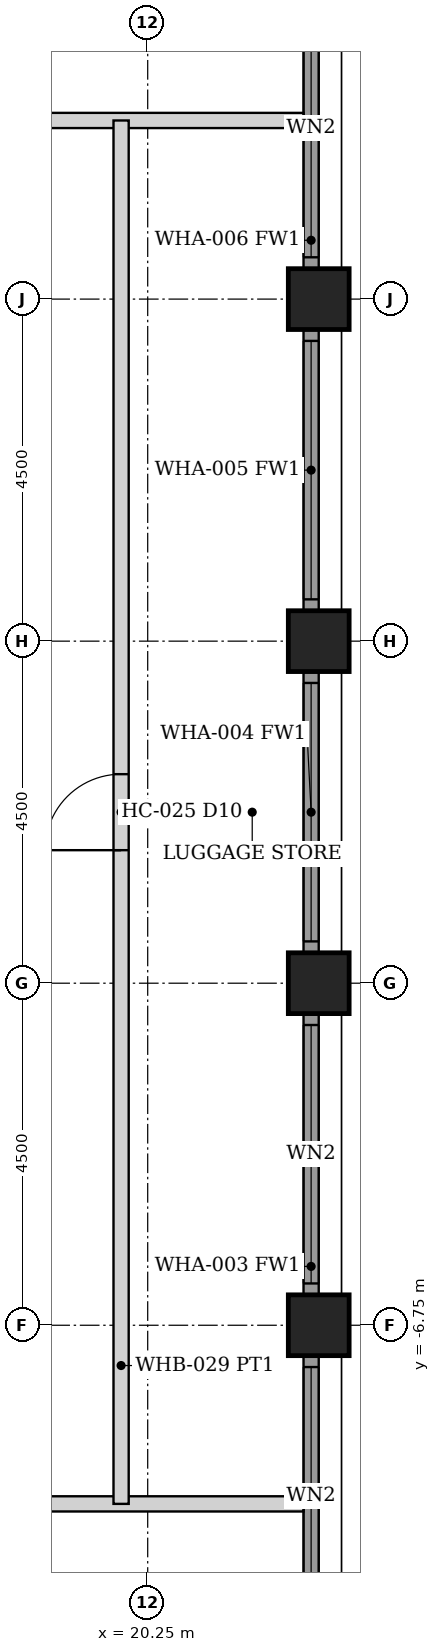
"""IFC4 building model, lengths in metres.
Left out: names, types, materials, properties, quantities, classifications, styles, units other than length and angle.
Written with IfcOpenShell. Run it as: python <this file> out.ifc"""

import sys

from ifc_helpers import new_model, si_unit, direction, frame, frame_2d, origin, origin_2d, place, context, subcontext, project, spatial, rectangle, hollow_rectangle, extrude, element, fill, save


model = new_model("IFC4")
c1 = context("Model", 3, precision=1e-05, world=origin(), true_north=direction((0.0, 1.0)))
c2 = subcontext(c1, "Body", "Model", "MODEL_VIEW")
j1 = project(units=[si_unit("LENGTHUNIT", "METRE"), si_unit("PLANEANGLEUNIT", "RADIAN")], contexts=[c1])
p1 = place(None, origin())
s1 = spatial("IfcSite", under=j1, at=p1, CompositionType="ELEMENT")
p2 = place(p1, origin())
s2 = spatial("IfcBuilding", under=s1, at=p2, CompositionType="ELEMENT")
p3 = place(p2, frame((0.0, 0.0, 140.0)))
s3 = spatial("IfcBuildingStorey", under=s2, at=p3, CompositionType="ELEMENT", Elevation=140.0)
for number, where, z_axis, x_axis in (
    (1, (22.5, -6.75, 0.0), (0.0, 0.0, 1.0), (1.0, 0.0, 0.0)),
    (2, (22.5, -2.25, 0.0), (0.0, 0.0, 1.0), (1.0, 0.0, 0.0)),
    (3, (22.5, 2.25, 0.0), (0.0, 0.0, 1.0), (1.0, 0.0, 0.0)),
    (4, (22.5, 6.75, 0.0), (0.0, 0.0, 1.0), (1.0, 0.0, 0.0)),
):
    element("IfcColumn", number, at=place(p3, frame(where, z_axis=z_axis, x_axis=x_axis)), inside=s3, PredefinedType="COLUMN", context=c2, shape_type="SweptSolid", body=[
        extrude(hollow_rectangle(XDim=0.8, YDim=0.8, WallThickness=0.05, at=origin_2d()), origin(), (0.0, 0.0, 1.0), 3.6),
    ])
p4 = place(p3, frame((22.4, -10.845, 0.0), z_axis=(0.0, 0.0, 1.0), x_axis=(0.0, 1.0, 0.0)))
e5 = element("IfcWall", 5, at=p4, inside=s3, PredefinedType="SOLIDWALL", context=c2, shape_type="SweptSolid", body=[
    extrude(rectangle(XDim=3.69, YDim=0.2, at=frame_2d((1.845, 0.0))), origin(), (0.0, 0.0, 1.0), 2.479),
])
p5 = place(p4, frame((0.145, 0.0, 0.3)))
e6 = element("IfcOpeningElement", 6, at=p5, cuts=e5, PredefinedType="OPENING", context=c2, shape_type="SweptSolid", body=[
    extrude(rectangle(XDim=3.4, YDim=2.029, at=frame_2d((1.7, 1.015))), frame((0.0, 0.11, 0.0), z_axis=(0.0, -1.0, 0.0), x_axis=(1.0, 0.0, 0.0)), (0.0, 0.0, 1.0), 0.22),
])
p6 = place(p3, frame((22.4, -6.345, 0.0), z_axis=(0.0, 0.0, 1.0), x_axis=(0.0, 1.0, 0.0)))
e7 = element("IfcWall", 7, at=p6, inside=s3, PredefinedType="SOLIDWALL", context=c2, shape_type="SweptSolid", body=[
    extrude(rectangle(XDim=3.69, YDim=0.2, at=frame_2d((1.845, 0.0))), origin(), (0.0, 0.0, 1.0), 2.479),
])
p7 = place(p6, frame((0.145, 0.0, 0.3)))
e8 = element("IfcOpeningElement", 8, at=p7, cuts=e7, PredefinedType="OPENING", context=c2, shape_type="SweptSolid", body=[
    extrude(rectangle(XDim=3.4, YDim=2.029, at=frame_2d((1.7, 1.015))), frame((0.0, 0.11, 0.0), z_axis=(0.0, -1.0, 0.0), x_axis=(1.0, 0.0, 0.0)), (0.0, 0.0, 1.0), 0.22),
])
p8 = place(p3, frame((22.4, -1.845, 0.0), z_axis=(0.0, 0.0, 1.0), x_axis=(0.0, 1.0, 0.0)))
e9 = element("IfcWall", 9, at=p8, inside=s3, PredefinedType="SOLIDWALL", context=c2, shape_type="SweptSolid", body=[
    extrude(rectangle(XDim=3.69, YDim=0.2, at=frame_2d((1.845, 0.0))), origin(), (0.0, 0.0, 1.0), 2.479),
])
p9 = place(p8, frame((0.145, 0.0, 0.3)))
e10 = element("IfcOpeningElement", 10, at=p9, cuts=e9, PredefinedType="OPENING", context=c2, shape_type="SweptSolid", body=[
    extrude(rectangle(XDim=3.4, YDim=2.029, at=frame_2d((1.7, 1.015))), frame((0.0, 0.11, 0.0), z_axis=(0.0, -1.0, 0.0), x_axis=(1.0, 0.0, 0.0)), (0.0, 0.0, 1.0), 0.22),
])
p10 = place(p3, frame((22.4, 2.655, 0.0), z_axis=(0.0, 0.0, 1.0), x_axis=(0.0, 1.0, 0.0)))
e11 = element("IfcWall", 11, at=p10, inside=s3, PredefinedType="SOLIDWALL", context=c2, shape_type="SweptSolid", body=[
    extrude(rectangle(XDim=3.69, YDim=0.2, at=frame_2d((1.845, 0.0))), origin(), (0.0, 0.0, 1.0), 2.479),
])
p11 = place(p10, frame((0.145, 0.0, 0.3)))
e12 = element("IfcOpeningElement", 12, at=p11, cuts=e11, PredefinedType="OPENING", context=c2, shape_type="SweptSolid", body=[
    extrude(rectangle(XDim=3.4, YDim=2.029, at=frame_2d((1.7, 1.015))), frame((0.0, 0.11, 0.0), z_axis=(0.0, -1.0, 0.0), x_axis=(1.0, 0.0, 0.0)), (0.0, 0.0, 1.0), 0.22),
])
p12 = place(p3, frame((22.4, 7.155, 0.0), z_axis=(0.0, 0.0, 1.0), x_axis=(0.0, 1.0, 0.0)))
e13 = element("IfcWall", 13, at=p12, inside=s3, PredefinedType="SOLIDWALL", context=c2, shape_type="SweptSolid", body=[
    extrude(rectangle(XDim=3.69, YDim=0.2, at=frame_2d((1.845, 0.0))), origin(), (0.0, 0.0, 1.0), 2.479),
])
p13 = place(p12, frame((0.145, 0.0, 0.3)))
e14 = element("IfcOpeningElement", 14, at=p13, cuts=e13, PredefinedType="OPENING", context=c2, shape_type="SweptSolid", body=[
    extrude(rectangle(XDim=3.4, YDim=2.029, at=frame_2d((1.7, 1.015))), frame((0.0, 0.11, 0.0), z_axis=(0.0, -1.0, 0.0), x_axis=(1.0, 0.0, 0.0)), (0.0, 0.0, 1.0), 0.22),
])
p14 = place(p3, frame((-22.3, 9.1, 0.0), z_axis=(0.0, 0.0, 1.0), x_axis=(1.0, 0.0, 0.0)))
e15 = element("IfcWall", 15, at=p14, inside=s3, PredefinedType="PARTITIONING", context=c2, shape_type="SweptSolid", body=[
    extrude(rectangle(XDim=44.6, YDim=0.2, at=frame_2d((22.3, 0.0))), origin(), (0.0, 0.0, 1.0), 2.473),
])
p15 = place(p14, frame((6.75, 0.0, 0.0)))
e16 = element("IfcOpeningElement", 16, at=p15, cuts=e15, PredefinedType="OPENING", context=c2, shape_type="SweptSolid", body=[
    extrude(rectangle(XDim=0.9, YDim=2.1, at=frame_2d((0.45, 1.05))), frame((0.0, 0.11, 0.0), z_axis=(0.0, -1.0, 0.0), x_axis=(1.0, 0.0, 0.0)), (0.0, 0.0, 1.0), 0.22),
])
p16 = place(p14, frame((14.45, 0.0, 0.0)))
e17 = element("IfcOpeningElement", 17, at=p16, cuts=e15, PredefinedType="OPENING", context=c2, shape_type="SweptSolid", body=[
    extrude(rectangle(XDim=0.9, YDim=2.1, at=frame_2d((0.45, 1.05))), frame((0.0, 0.11, 0.0), z_axis=(0.0, -1.0, 0.0), x_axis=(1.0, 0.0, 0.0)), (0.0, 0.0, 1.0), 0.22),
])
p17 = place(p14, frame((15.75, 0.0, 0.0)))
e18 = element("IfcOpeningElement", 18, at=p17, cuts=e15, PredefinedType="OPENING", context=c2, shape_type="SweptSolid", body=[
    extrude(rectangle(XDim=0.9, YDim=2.1, at=frame_2d((0.45, 1.05))), frame((0.0, 0.11, 0.0), z_axis=(0.0, -1.0, 0.0), x_axis=(1.0, 0.0, 0.0)), (0.0, 0.0, 1.0), 0.22),
])
p18 = place(p14, frame((23.45, 0.0, 0.0)))
e19 = element("IfcOpeningElement", 19, at=p18, cuts=e15, PredefinedType="OPENING", context=c2, shape_type="SweptSolid", body=[
    extrude(rectangle(XDim=0.9, YDim=2.1, at=frame_2d((0.45, 1.05))), frame((0.0, 0.11, 0.0), z_axis=(0.0, -1.0, 0.0), x_axis=(1.0, 0.0, 0.0)), (0.0, 0.0, 1.0), 0.22),
])
p19 = place(p14, frame((24.75, 0.0, 0.0)))
e20 = element("IfcOpeningElement", 20, at=p19, cuts=e15, PredefinedType="OPENING", context=c2, shape_type="SweptSolid", body=[
    extrude(rectangle(XDim=0.9, YDim=2.1, at=frame_2d((0.45, 1.05))), frame((0.0, 0.11, 0.0), z_axis=(0.0, -1.0, 0.0), x_axis=(1.0, 0.0, 0.0)), (0.0, 0.0, 1.0), 0.22),
])
p20 = place(p14, frame((36.95, 0.0, 0.0)))
e21 = element("IfcOpeningElement", 21, at=p20, cuts=e15, PredefinedType="OPENING", context=c2, shape_type="SweptSolid", body=[
    extrude(rectangle(XDim=0.9, YDim=2.1, at=frame_2d((0.45, 1.05))), frame((0.0, 0.11, 0.0), z_axis=(0.0, -1.0, 0.0), x_axis=(1.0, 0.0, 0.0)), (0.0, 0.0, 1.0), 0.22),
])
p21 = place(p14, frame((38.85, 0.0, 0.0)))
e22 = element("IfcOpeningElement", 22, at=p21, cuts=e15, PredefinedType="OPENING", context=c2, shape_type="SweptSolid", body=[
    extrude(rectangle(XDim=0.9, YDim=2.1, at=frame_2d((0.45, 1.05))), frame((0.0, 0.11, 0.0), z_axis=(0.0, -1.0, 0.0), x_axis=(1.0, 0.0, 0.0)), (0.0, 0.0, 1.0), 0.22),
])
p22 = place(p14, frame((4.85, 0.0, 0.0)))
e23 = element("IfcOpeningElement", 23, at=p22, cuts=e15, PredefinedType="OPENING", context=c2, shape_type="SweptSolid", body=[
    extrude(rectangle(XDim=0.9, YDim=2.1, at=frame_2d((0.45, 1.05))), frame((0.0, 0.11, 0.0), z_axis=(0.0, -1.0, 0.0), x_axis=(1.0, 0.0, 0.0)), (0.0, 0.0, 1.0), 0.22),
])
p23 = place(p3, frame((-22.3, -9.1, 0.0), z_axis=(0.0, 0.0, 1.0), x_axis=(1.0, 0.0, 0.0)))
e24 = element("IfcWall", 24, at=p23, inside=s3, PredefinedType="PARTITIONING", context=c2, shape_type="SweptSolid", body=[
    extrude(rectangle(XDim=44.6, YDim=0.2, at=frame_2d((22.3, 0.0))), origin(), (0.0, 0.0, 1.0), 2.473),
])
p24 = place(p23, frame((6.75, 0.0, 0.0)))
e25 = element("IfcOpeningElement", 25, at=p24, cuts=e24, PredefinedType="OPENING", context=c2, shape_type="SweptSolid", body=[
    extrude(rectangle(XDim=0.9, YDim=2.1, at=frame_2d((0.45, 1.05))), frame((0.0, 0.11, 0.0), z_axis=(0.0, -1.0, 0.0), x_axis=(1.0, 0.0, 0.0)), (0.0, 0.0, 1.0), 0.22),
])
p25 = place(p23, frame((14.45, 0.0, 0.0)))
e26 = element("IfcOpeningElement", 26, at=p25, cuts=e24, PredefinedType="OPENING", context=c2, shape_type="SweptSolid", body=[
    extrude(rectangle(XDim=0.9, YDim=2.1, at=frame_2d((0.45, 1.05))), frame((0.0, 0.11, 0.0), z_axis=(0.0, -1.0, 0.0), x_axis=(1.0, 0.0, 0.0)), (0.0, 0.0, 1.0), 0.22),
])
p26 = place(p23, frame((15.75, 0.0, 0.0)))
e27 = element("IfcOpeningElement", 27, at=p26, cuts=e24, PredefinedType="OPENING", context=c2, shape_type="SweptSolid", body=[
    extrude(rectangle(XDim=0.9, YDim=2.1, at=frame_2d((0.45, 1.05))), frame((0.0, 0.11, 0.0), z_axis=(0.0, -1.0, 0.0), x_axis=(1.0, 0.0, 0.0)), (0.0, 0.0, 1.0), 0.22),
])
p27 = place(p23, frame((24.75, 0.0, 0.0)))
e28 = element("IfcOpeningElement", 28, at=p27, cuts=e24, PredefinedType="OPENING", context=c2, shape_type="SweptSolid", body=[
    extrude(rectangle(XDim=0.9, YDim=2.1, at=frame_2d((0.45, 1.05))), frame((0.0, 0.11, 0.0), z_axis=(0.0, -1.0, 0.0), x_axis=(1.0, 0.0, 0.0)), (0.0, 0.0, 1.0), 0.22),
])
p28 = place(p23, frame((36.95, 0.0, 0.0)))
e29 = element("IfcOpeningElement", 29, at=p28, cuts=e24, PredefinedType="OPENING", context=c2, shape_type="SweptSolid", body=[
    extrude(rectangle(XDim=0.9, YDim=2.1, at=frame_2d((0.45, 1.05))), frame((0.0, 0.11, 0.0), z_axis=(0.0, -1.0, 0.0), x_axis=(1.0, 0.0, 0.0)), (0.0, 0.0, 1.0), 0.22),
])
p29 = place(p23, frame((38.85, 0.0, 0.0)))
e30 = element("IfcOpeningElement", 30, at=p29, cuts=e24, PredefinedType="OPENING", context=c2, shape_type="SweptSolid", body=[
    extrude(rectangle(XDim=0.9, YDim=2.1, at=frame_2d((0.45, 1.05))), frame((0.0, 0.11, 0.0), z_axis=(0.0, -1.0, 0.0), x_axis=(1.0, 0.0, 0.0)), (0.0, 0.0, 1.0), 0.22),
])
p30 = place(p23, frame((4.85, 0.0, 0.0)))
e31 = element("IfcOpeningElement", 31, at=p30, cuts=e24, PredefinedType="OPENING", context=c2, shape_type="SweptSolid", body=[
    extrude(rectangle(XDim=0.9, YDim=2.1, at=frame_2d((0.45, 1.05))), frame((0.0, 0.11, 0.0), z_axis=(0.0, -1.0, 0.0), x_axis=(1.0, 0.0, 0.0)), (0.0, 0.0, 1.0), 0.22),
])
p31 = place(p3, frame((19.9, -9.1, 0.0), z_axis=(0.0, 0.0, 1.0), x_axis=(0.0, 1.0, 0.0)))
e32 = element("IfcWall", 32, at=p31, inside=s3, PredefinedType="PARTITIONING", context=c2, shape_type="SweptSolid", body=[
    extrude(rectangle(XDim=18.2, YDim=0.2, at=frame_2d((9.1, 0.0))), origin(), (0.0, 0.0, 1.0), 2.473),
])
p32 = place(p31, frame((8.6, 0.0, 0.0)))
e33 = element("IfcOpeningElement", 33, at=p32, cuts=e32, PredefinedType="OPENING", context=c2, shape_type="SweptSolid", body=[
    extrude(rectangle(XDim=1.0, YDim=2.1, at=frame_2d((0.5, 1.05))), frame((0.0, 0.11, 0.0), z_axis=(0.0, -1.0, 0.0), x_axis=(1.0, 0.0, 0.0)), (0.0, 0.0, 1.0), 0.22),
])
p33 = place(p5, origin())
e34 = element("IfcWindow", 34, at=p33, inside=s3, PartitioningType="SINGLE_PANEL", PredefinedType="WINDOW", context=c2, shape_type="SweptSolid", body=[
    extrude(rectangle(XDim=3.4, YDim=2.029, at=frame_2d((1.7, 1.015))), frame((0.0, 0.03, 0.0), z_axis=(0.0, -1.0, 0.0), x_axis=(1.0, 0.0, 0.0)), (0.0, 0.0, 1.0), 0.06),
])
fill(e6, e34)
p34 = place(p7, origin())
e35 = element("IfcWindow", 35, at=p34, inside=s3, PartitioningType="SINGLE_PANEL", PredefinedType="WINDOW", context=c2, shape_type="SweptSolid", body=[
    extrude(rectangle(XDim=3.4, YDim=2.029, at=frame_2d((1.7, 1.015))), frame((0.0, 0.03, 0.0), z_axis=(0.0, -1.0, 0.0), x_axis=(1.0, 0.0, 0.0)), (0.0, 0.0, 1.0), 0.06),
])
fill(e8, e35)
p35 = place(p9, origin())
e36 = element("IfcWindow", 36, at=p35, inside=s3, PartitioningType="SINGLE_PANEL", PredefinedType="WINDOW", context=c2, shape_type="SweptSolid", body=[
    extrude(rectangle(XDim=3.4, YDim=2.029, at=frame_2d((1.7, 1.015))), frame((0.0, 0.03, 0.0), z_axis=(0.0, -1.0, 0.0), x_axis=(1.0, 0.0, 0.0)), (0.0, 0.0, 1.0), 0.06),
])
fill(e10, e36)
p36 = place(p11, origin())
e37 = element("IfcWindow", 37, at=p36, inside=s3, PartitioningType="SINGLE_PANEL", PredefinedType="WINDOW", context=c2, shape_type="SweptSolid", body=[
    extrude(rectangle(XDim=3.4, YDim=2.029, at=frame_2d((1.7, 1.015))), frame((0.0, 0.03, 0.0), z_axis=(0.0, -1.0, 0.0), x_axis=(1.0, 0.0, 0.0)), (0.0, 0.0, 1.0), 0.06),
])
fill(e12, e37)
p37 = place(p13, origin())
e38 = element("IfcWindow", 38, at=p37, inside=s3, PartitioningType="SINGLE_PANEL", PredefinedType="WINDOW", context=c2, shape_type="SweptSolid", body=[
    extrude(rectangle(XDim=3.4, YDim=2.029, at=frame_2d((1.7, 1.015))), frame((0.0, 0.03, 0.0), z_axis=(0.0, -1.0, 0.0), x_axis=(1.0, 0.0, 0.0)), (0.0, 0.0, 1.0), 0.06),
])
fill(e14, e38)
p38 = place(p32, origin())
e39 = element("IfcDoor", 39, at=p38, inside=s3, OperationType="SINGLE_SWING_LEFT", PredefinedType="DOOR", context=c2, shape_type="SweptSolid", body=[
    extrude(rectangle(XDim=1.0, YDim=2.1, at=frame_2d((0.5, 1.05))), frame((0.0, 0.025, 0.0), z_axis=(0.0, -1.0, 0.0), x_axis=(1.0, 0.0, 0.0)), (0.0, 0.0, 1.0), 0.05),
])
fill(e33, e39)
save(model, sys.argv[1])
